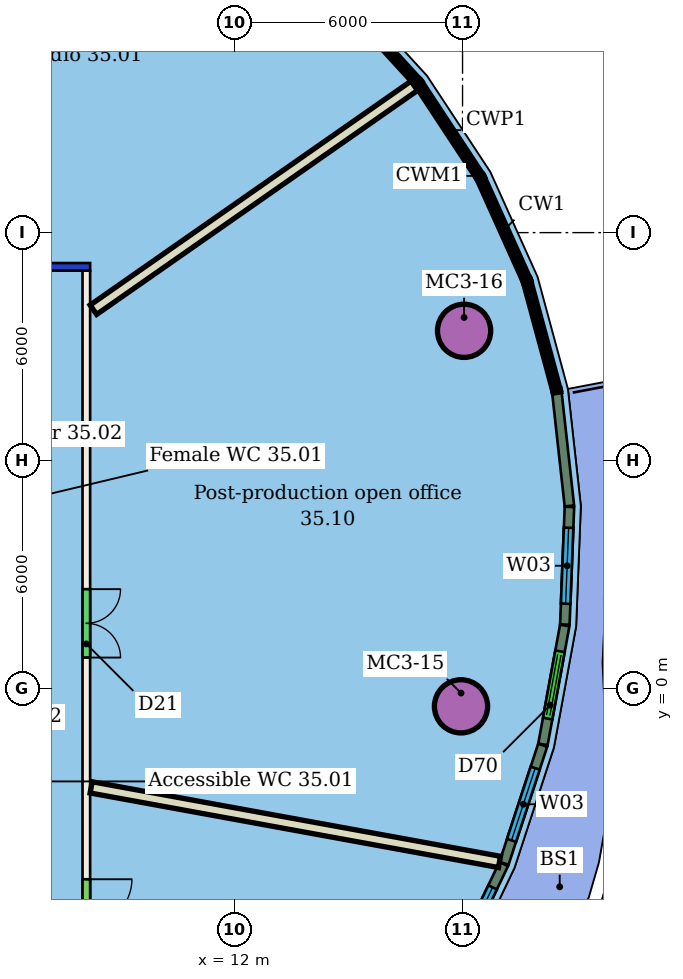
"""IFC4 building model, lengths in metres.
Left out: names, types, materials, properties, quantities, classifications, styles, units other than length and angle.
Written with IfcOpenShell. Run it as: python <this file> out.ifc"""

import sys

from ifc_helpers import new_model, si_unit, direction, frame, frame_2d, origin, origin_2d, place, context, subcontext, project, spatial, rectangle, hollow_circle, extrude, element, fill, save


model = new_model("IFC4")
c1 = context("Model", 3, precision=1e-05, world=origin(), true_north=direction((0.0, 1.0)))
c2 = subcontext(c1, "Body", "Model", "MODEL_VIEW")
j1 = project(units=[si_unit("LENGTHUNIT", "METRE"), si_unit("PLANEANGLEUNIT", "RADIAN")], contexts=[c1])
p1 = place(None, origin())
s1 = spatial("IfcSite", under=j1, at=p1, CompositionType="ELEMENT")
p2 = place(p1, origin())
s2 = spatial("IfcBuilding", under=s1, at=p2, CompositionType="ELEMENT")
p3 = place(p2, frame((0.0, 0.0, 150.6)))
s3 = spatial("IfcBuildingStorey", under=s2, at=p3, CompositionType="ELEMENT", Elevation=150.6)
for number, where, z_axis, x_axis in (
    (1, (17.959, -0.464, 0.0), (0.0, 0.0, 1.0), (1.0, 0.0, 0.0)),
    (2, (18.041, 9.417, 0.0), (0.0, 0.0, 1.0), (1.0, 0.0, 0.0)),
):
    element("IfcColumn", number, at=place(p3, frame(where, z_axis=z_axis, x_axis=x_axis)), inside=s3, PredefinedType="COLUMN", context=c2, shape_type="SweptSolid", body=[
        extrude(hollow_circle(Radius=0.7, WallThickness=0.05, at=origin_2d()), origin(), (0.0, 0.0, 1.0), 3.45),
    ])
p4 = place(p3, frame((-20.2, 11.1, 0.0), z_axis=(0.0, 0.0, 1.0), x_axis=(1.0, 0.0, 0.0)))
e3 = element("IfcWall", 3, at=p4, inside=s3, PredefinedType="PARTITIONING", context=c2, shape_type="SweptSolid", body=[
    extrude(rectangle(XDim=28.4, YDim=0.2, at=frame_2d((14.2, 0.0))), origin(), (0.0, 0.0, 1.0), 3.05),
])
p5 = place(p4, frame((20.358, 0.0, 0.0)))
e4 = element("IfcOpeningElement", 4, at=p5, cuts=e3, PredefinedType="OPENING", context=c2, shape_type="SweptSolid", body=[
    extrude(rectangle(XDim=1.1, YDim=2.1, at=frame_2d((0.55, 1.05))), frame((0.0, 0.11, 0.0), z_axis=(0.0, -1.0, 0.0), x_axis=(1.0, 0.0, 0.0)), (0.0, 0.0, 1.0), 0.22),
])
p6 = place(p4, frame((10.659, 0.0, 0.0)))
e5 = element("IfcOpeningElement", 5, at=p6, cuts=e3, PredefinedType="OPENING", context=c2, shape_type="SweptSolid", body=[
    extrude(rectangle(XDim=1.0, YDim=2.1, at=frame_2d((0.5, 1.05))), frame((0.0, 0.11, 0.0), z_axis=(0.0, -1.0, 0.0), x_axis=(1.0, 0.0, 0.0)), (0.0, 0.0, 1.0), 0.22),
])
p7 = place(p4, frame((5.245, 0.0, 0.0)))
e6 = element("IfcOpeningElement", 6, at=p7, cuts=e3, PredefinedType="OPENING", context=c2, shape_type="SweptSolid", body=[
    extrude(rectangle(XDim=1.2, YDim=2.1, at=frame_2d((0.6, 1.05))), frame((0.0, 0.11, 0.0), z_axis=(0.0, -1.0, 0.0), x_axis=(1.0, 0.0, 0.0)), (0.0, 0.0, 1.0), 0.22),
])
p8 = place(p3, frame((8.1, 11.0, 0.0), z_axis=(0.0, 0.0, 1.0), x_axis=(0.0, -1.0, 0.0)))
e7 = element("IfcWall", 7, at=p8, inside=s3, PredefinedType="PARTITIONING", context=c2, shape_type="SweptSolid", body=[
    extrude(rectangle(XDim=22.0, YDim=0.2, at=frame_2d((11.0, 0.0))), origin(), (0.0, 0.0, 1.0), 3.45),
])
p9 = place(p8, frame((16.014, 0.0, 0.0)))
e8 = element("IfcOpeningElement", 8, at=p9, cuts=e7, PredefinedType="OPENING", context=c2, shape_type="SweptSolid", body=[
    extrude(rectangle(XDim=1.2, YDim=2.1, at=frame_2d((0.6, 1.05))), frame((0.0, 0.11, 0.0), z_axis=(0.0, -1.0, 0.0), x_axis=(1.0, 0.0, 0.0)), (0.0, 0.0, 1.0), 0.22),
])
p10 = place(p8, frame((8.381, 0.0, 0.0)))
e9 = element("IfcOpeningElement", 9, at=p10, cuts=e7, PredefinedType="OPENING", context=c2, shape_type="SweptSolid", body=[
    extrude(rectangle(XDim=1.8, YDim=2.1, at=frame_2d((0.9, 1.05))), frame((0.0, 0.11, 0.0), z_axis=(0.0, -1.0, 0.0), x_axis=(1.0, 0.0, 0.0)), (0.0, 0.0, 1.0), 0.22),
])
p11 = place(p3, frame((16.731, 15.864, 0.0), z_axis=(0.0, 0.0, 1.0), x_axis=(-0.820033028479, -0.572316199494, 0.0)))
e10 = element("IfcWall", 10, at=p11, inside=s3, PredefinedType="PARTITIONING", context=c2, shape_type="SweptSolid", body=[
    extrude(rectangle(XDim=10.298, YDim=0.3, at=frame_2d((5.149, 0.0))), origin(), (0.0, 0.0, 1.0), 3.45),
])
p12 = place(p3, frame((18.972, -4.558, 0.0), z_axis=(0.0, 0.0, 1.0), x_axis=(-0.983747727231, 0.179556144892, 0.0)))
e11 = element("IfcWall", 11, at=p12, inside=s3, PredefinedType="PARTITIONING", context=c2, shape_type="SweptSolid", body=[
    extrude(rectangle(XDim=10.922, YDim=0.3, at=frame_2d((5.461, 0.0))), origin(), (0.0, 0.0, 1.0), 3.45),
])
p13 = place(p3, frame((17.638, -7.645, 0.0), z_axis=(0.0, 0.0, 1.0), x_axis=(0.430495314567, 0.902592811923, 0.0)))
e12 = element("IfcWall", 12, at=p13, inside=s3, PredefinedType="SOLIDWALL", context=c2, shape_type="SweptSolid", body=[
    extrude(rectangle(XDim=3.357, YDim=0.25, at=frame_2d((1.678, 0.0))), origin(), (0.0, 0.0, 1.0), 3.1),
])
p14 = place(p13, frame((0.678, 0.0, 0.9)))
e13 = element("IfcOpeningElement", 13, at=p14, cuts=e12, PredefinedType="OPENING", context=c2, shape_type="SweptSolid", body=[
    extrude(rectangle(XDim=2.0, YDim=2.1, at=frame_2d((1.0, 1.05))), frame((0.0, 0.135, 0.0), z_axis=(0.0, -1.0, 0.0), x_axis=(1.0, 0.0, 0.0)), (0.0, 0.0, 1.0), 0.27),
])
p15 = place(p3, frame((19.092, -4.593, 0.0), z_axis=(0.0, 0.0, 1.0), x_axis=(0.311426794422, 0.950270146704, 0.0)))
e14 = element("IfcWall", 14, at=p15, inside=s3, PredefinedType="SOLIDWALL", context=c2, shape_type="SweptSolid", body=[
    extrude(rectangle(XDim=3.268, YDim=0.25, at=frame_2d((1.634, 0.0))), origin(), (0.0, 0.0, 1.0), 3.1),
])
p16 = place(p15, frame((0.634, 0.0, 0.9)))
e15 = element("IfcOpeningElement", 15, at=p16, cuts=e14, PredefinedType="OPENING", context=c2, shape_type="SweptSolid", body=[
    extrude(rectangle(XDim=2.0, YDim=2.1, at=frame_2d((1.0, 1.05))), frame((0.0, 0.135, 0.0), z_axis=(0.0, -1.0, 0.0), x_axis=(1.0, 0.0, 0.0)), (0.0, 0.0, 1.0), 0.27),
])
p17 = place(p3, frame((20.115, -1.464, 0.0), z_axis=(0.0, 0.0, 1.0), x_axis=(0.18041951624, 0.983589750943, 0.0)))
e16 = element("IfcWall", 16, at=p17, inside=s3, PredefinedType="SOLIDWALL", context=c2, shape_type="SweptSolid", body=[
    extrude(rectangle(XDim=3.179, YDim=0.25, at=frame_2d((1.589, 0.0))), origin(), (0.0, 0.0, 1.0), 3.1),
])
p18 = place(p17, frame((0.689, 0.0, 0.0)))
e17 = element("IfcOpeningElement", 17, at=p18, cuts=e16, PredefinedType="OPENING", context=c2, shape_type="SweptSolid", body=[
    extrude(rectangle(XDim=1.8, YDim=2.4, at=frame_2d((0.9, 1.2))), frame((0.0, 0.135, 0.0), z_axis=(0.0, -1.0, 0.0), x_axis=(1.0, 0.0, 0.0)), (0.0, 0.0, 1.0), 0.27),
])
p19 = place(p3, frame((20.691, 1.688, 0.0), z_axis=(0.0, 0.0, 1.0), x_axis=(0.039102222246, 0.99923521566, 0.0)))
e18 = element("IfcWall", 18, at=p19, inside=s3, PredefinedType="SOLIDWALL", context=c2, shape_type="SweptSolid", body=[
    extrude(rectangle(XDim=3.097, YDim=0.25, at=frame_2d((1.548, 0.0))), origin(), (0.0, 0.0, 1.0), 3.1),
])
p20 = place(p19, frame((0.548, 0.0, 0.9)))
e19 = element("IfcOpeningElement", 19, at=p20, cuts=e18, PredefinedType="OPENING", context=c2, shape_type="SweptSolid", body=[
    extrude(rectangle(XDim=2.0, YDim=2.1, at=frame_2d((1.0, 1.05))), frame((0.0, 0.135, 0.0), z_axis=(0.0, -1.0, 0.0), x_axis=(1.0, 0.0, 0.0)), (0.0, 0.0, 1.0), 0.27),
])
p21 = place(p3, frame((20.812, 4.809, 0.0), z_axis=(0.0, 0.0, 1.0), x_axis=(-0.109695830788, 0.993965202966, 0.0)))
e20 = element("IfcWall", 20, at=p21, inside=s3, PredefinedType="SOLIDWALL", context=c2, shape_type="SweptSolid", body=[
    extrude(rectangle(XDim=2.987, YDim=0.25, at=frame_2d((1.493, 0.0))), origin(), (0.0, 0.0, 1.0), 3.1),
])
p22 = place(p9, origin())
e21 = element("IfcDoor", 21, at=p22, inside=s3, OperationType="SINGLE_SWING_LEFT", PredefinedType="DOOR", context=c2, shape_type="SweptSolid", body=[
    extrude(rectangle(XDim=1.2, YDim=2.1, at=frame_2d((0.6, 1.05))), frame((0.0, 0.025, 0.0), z_axis=(0.0, -1.0, 0.0), x_axis=(1.0, 0.0, 0.0)), (0.0, 0.0, 1.0), 0.05),
])
fill(e8, e21)
p23 = place(p10, origin())
e22 = element("IfcDoor", 22, at=p23, inside=s3, OperationType="DOUBLE_DOOR_SINGLE_SWING", PredefinedType="DOOR", context=c2, shape_type="SweptSolid", body=[
    extrude(rectangle(XDim=1.8, YDim=2.1, at=frame_2d((0.9, 1.05))), frame((0.0, 0.025, 0.0), z_axis=(0.0, -1.0, 0.0), x_axis=(1.0, 0.0, 0.0)), (0.0, 0.0, 1.0), 0.05),
])
fill(e9, e22)
p24 = place(p14, origin())
e23 = element("IfcWindow", 23, at=p24, inside=s3, PartitioningType="SINGLE_PANEL", PredefinedType="WINDOW", context=c2, shape_type="SweptSolid", body=[
    extrude(rectangle(XDim=2.0, YDim=2.1, at=frame_2d((1.0, 1.05))), frame((0.0, 0.03, 0.0), z_axis=(0.0, -1.0, 0.0), x_axis=(1.0, 0.0, 0.0)), (0.0, 0.0, 1.0), 0.06),
])
fill(e13, e23)
p25 = place(p16, origin())
e24 = element("IfcWindow", 24, at=p25, inside=s3, PartitioningType="SINGLE_PANEL", PredefinedType="WINDOW", context=c2, shape_type="SweptSolid", body=[
    extrude(rectangle(XDim=2.0, YDim=2.1, at=frame_2d((1.0, 1.05))), frame((0.0, 0.03, 0.0), z_axis=(0.0, -1.0, 0.0), x_axis=(1.0, 0.0, 0.0)), (0.0, 0.0, 1.0), 0.06),
])
fill(e15, e24)
p26 = place(p18, origin())
e25 = element("IfcDoor", 25, at=p26, inside=s3, OperationType="DOUBLE_DOOR_SLIDING", PredefinedType="DOOR", context=c2, shape_type="SweptSolid", body=[
    extrude(rectangle(XDim=1.8, YDim=2.4, at=frame_2d((0.9, 1.2))), frame((0.0, 0.025, 0.0), z_axis=(0.0, -1.0, 0.0), x_axis=(1.0, 0.0, 0.0)), (0.0, 0.0, 1.0), 0.05),
])
fill(e17, e25)
p27 = place(p20, origin())
e26 = element("IfcWindow", 26, at=p27, inside=s3, PartitioningType="SINGLE_PANEL", PredefinedType="WINDOW", context=c2, shape_type="SweptSolid", body=[
    extrude(rectangle(XDim=2.0, YDim=2.1, at=frame_2d((1.0, 1.05))), frame((0.0, 0.03, 0.0), z_axis=(0.0, -1.0, 0.0), x_axis=(1.0, 0.0, 0.0)), (0.0, 0.0, 1.0), 0.06),
])
fill(e19, e26)
save(model, sys.argv[1])
